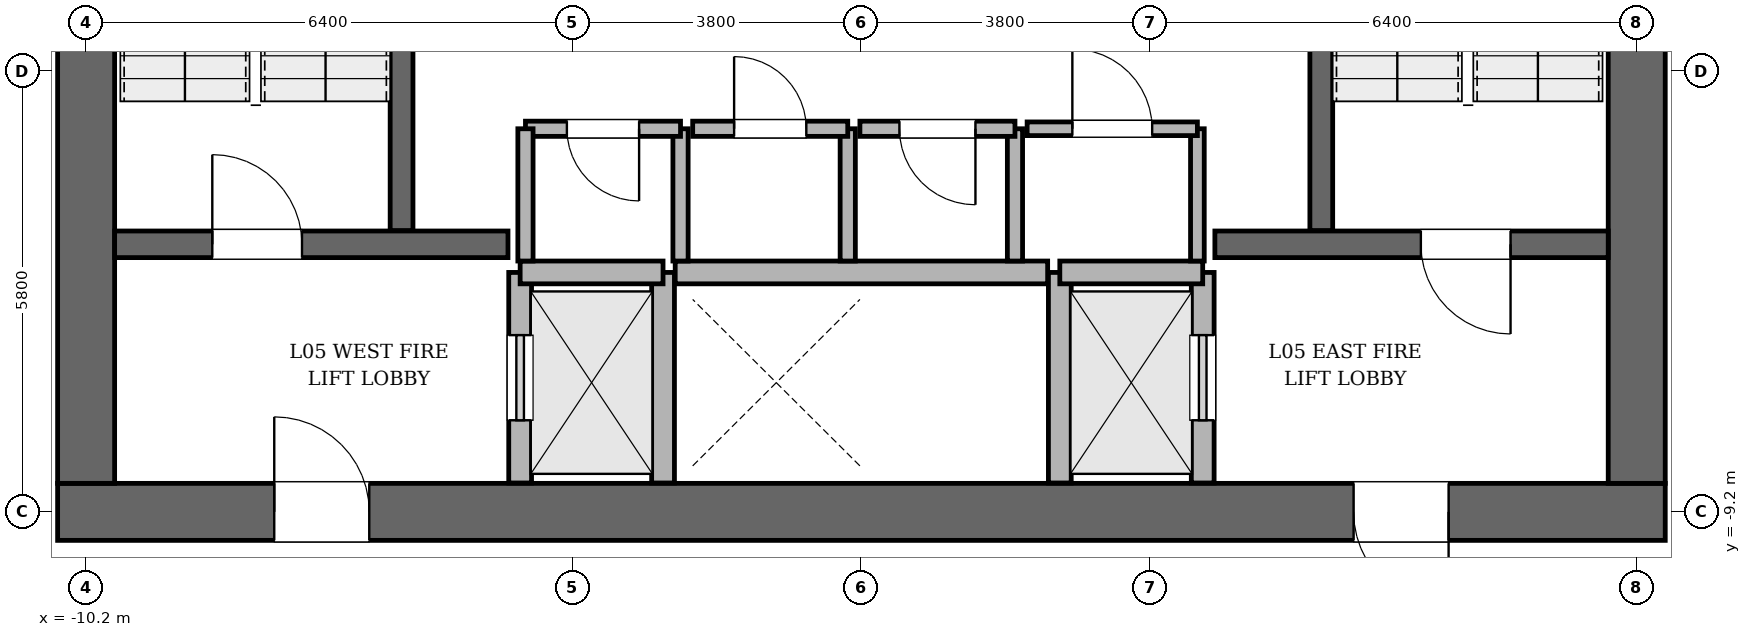
"""IFC4 building model, lengths in metres.
Left out: names, types, materials, properties, quantities, classifications, styles, units other than length and angle.
Written with IfcOpenShell. Run it as: python <this file> out.ifc"""

import sys

from ifc_helpers import new_model, si_unit, direction, frame, frame_2d, origin, place, context, subcontext, project, spatial, rectangle, extrude, element, fill, save


model = new_model("IFC4")
c1 = context("Model", 3, precision=1e-05, world=origin(), true_north=direction((0.0, 1.0)))
c2 = subcontext(c1, "Body", "Model", "MODEL_VIEW")
j1 = project(units=[si_unit("LENGTHUNIT", "METRE"), si_unit("PLANEANGLEUNIT", "RADIAN")], contexts=[c1])
p1 = place(None, origin())
s1 = spatial("IfcSite", under=j1, at=p1, CompositionType="ELEMENT")
p2 = place(p1, origin())
s2 = spatial("IfcBuilding", under=s1, at=p2, CompositionType="ELEMENT")
p3 = place(p2, frame((0.0, 0.0, 28.2)))
s3 = spatial("IfcBuildingStorey", under=s2, at=p3, CompositionType="ELEMENT", Elevation=28.2)
p4 = place(p3, frame((10.575, -9.2, 0.0), z_axis=(0.0, 0.0, 1.0), x_axis=(-1.0, 0.0, 0.0)))
e1 = element("IfcWall", 1, at=p4, inside=s3, PredefinedType="SHEAR", context=c2, shape_type="SweptSolid", body=[
    extrude(rectangle(XDim=21.15, YDim=0.75, at=frame_2d((10.575, 0.0))), origin(), (0.0, 0.0, 1.0), 4.05),
])
p5 = place(p4, frame((2.85, 0.0, 0.0)))
e2 = element("IfcOpeningElement", 2, at=p5, cuts=e1, PredefinedType="OPENING", context=c2, shape_type="SweptSolid", body=[
    extrude(rectangle(XDim=1.25, YDim=2.25, at=frame_2d((0.625, 1.125))), frame((0.0, 0.385, 0.0), z_axis=(0.0, -1.0, 0.0), x_axis=(1.0, 0.0, 0.0)), (0.0, 0.0, 1.0), 0.77),
])
p6 = place(p4, frame((17.05, 0.0, 0.0)))
e3 = element("IfcOpeningElement", 3, at=p6, cuts=e1, PredefinedType="OPENING", context=c2, shape_type="SweptSolid", body=[
    extrude(rectangle(XDim=1.25, YDim=2.25, at=frame_2d((0.625, 1.125))), frame((0.0, 0.385, 0.0), z_axis=(0.0, -1.0, 0.0), x_axis=(1.0, 0.0, 0.0)), (0.0, 0.0, 1.0), 0.77),
])
p7 = place(p3, frame((-10.2, -8.825, 0.0), z_axis=(0.0, 0.0, 1.0), x_axis=(0.0, 1.0, 0.0)))
e4 = element("IfcWall", 4, at=p7, inside=s3, PredefinedType="SHEAR", context=c2, shape_type="SweptSolid", body=[
    extrude(rectangle(XDim=17.65, YDim=0.75, at=frame_2d((8.825, 0.0))), origin(), (0.0, 0.0, 1.0), 4.05),
])
p8 = place(p7, frame((12.615, 0.0, 0.0)))
e5 = element("IfcOpeningElement", 5, at=p8, cuts=e4, PredefinedType="OPENING", context=c2, shape_type="SweptSolid", body=[
    extrude(rectangle(XDim=1.18, YDim=2.2, at=frame_2d((0.59, 1.1))), frame((0.0, 0.385, 0.0), z_axis=(0.0, -1.0, 0.0), x_axis=(1.0, 0.0, 0.0)), (0.0, 0.0, 1.0), 0.77),
])
p9 = place(p3, frame((10.2, 8.825, 0.0), z_axis=(0.0, 0.0, 1.0), x_axis=(0.0, -1.0, 0.0)))
e6 = element("IfcWall", 6, at=p9, inside=s3, PredefinedType="SHEAR", context=c2, shape_type="SweptSolid", body=[
    extrude(rectangle(XDim=17.65, YDim=0.75, at=frame_2d((8.825, 0.0))), origin(), (0.0, 0.0, 1.0), 4.05),
])
p10 = place(p9, frame((3.855, 0.0, 0.0)))
e7 = element("IfcOpeningElement", 7, at=p10, cuts=e6, PredefinedType="OPENING", context=c2, shape_type="SweptSolid", body=[
    extrude(rectangle(XDim=1.18, YDim=2.2, at=frame_2d((0.59, 1.1))), frame((0.0, 0.385, 0.0), z_axis=(0.0, -1.0, 0.0), x_axis=(1.0, 0.0, 0.0)), (0.0, 0.0, 1.0), 0.77),
])
for number, where, z_axis, x_axis in (
    (8, (-6.05, -5.5, 0.0), (0.0, 0.0, 1.0), (0.0, 1.0, 0.0)),
    (9, (6.05, 3.45, 0.0), (0.0, 0.0, 1.0), (0.0, -1.0, 0.0)),
):
    element("IfcWall", number, at=place(p3, frame(where, z_axis=z_axis, x_axis=x_axis)), inside=s3, PredefinedType="SOLIDWALL", context=c2, shape_type="SweptSolid", body=[
        extrude(rectangle(XDim=8.95, YDim=0.3, at=frame_2d((4.475, 0.0))), origin(), (0.0, 0.0, 1.0), 4.05),
    ])
p11 = place(p3, frame((-9.825, -5.68, 0.0), z_axis=(0.0, 0.0, 1.0), x_axis=(1.0, 0.0, 0.0)))
e10 = element("IfcWall", 10, at=p11, inside=s3, PredefinedType="SOLIDWALL", context=c2, shape_type="SweptSolid", body=[
    extrude(rectangle(XDim=5.175, YDim=0.35, at=frame_2d((2.587, 0.0))), origin(), (0.0, 0.0, 1.0), 4.05),
])
p12 = place(p11, frame((1.285, 0.0, 0.0)))
e11 = element("IfcOpeningElement", 11, at=p12, cuts=e10, PredefinedType="OPENING", context=c2, shape_type="SweptSolid", body=[
    extrude(rectangle(XDim=1.18, YDim=2.2, at=frame_2d((0.59, 1.1))), frame((0.0, 0.185, 0.0), z_axis=(0.0, -1.0, 0.0), x_axis=(1.0, 0.0, 0.0)), (0.0, 0.0, 1.0), 0.37),
])
p13 = place(p3, frame((4.65, -5.68, 0.0), z_axis=(0.0, 0.0, 1.0), x_axis=(1.0, 0.0, 0.0)))
e12 = element("IfcWall", 12, at=p13, inside=s3, PredefinedType="SOLIDWALL", context=c2, shape_type="SweptSolid", body=[
    extrude(rectangle(XDim=5.175, YDim=0.35, at=frame_2d((2.587, 0.0))), origin(), (0.0, 0.0, 1.0), 4.05),
])
p14 = place(p13, frame((2.71, 0.0, 0.0)))
e13 = element("IfcOpeningElement", 13, at=p14, cuts=e12, PredefinedType="OPENING", context=c2, shape_type="SweptSolid", body=[
    extrude(rectangle(XDim=1.18, YDim=2.2, at=frame_2d((0.59, 1.1))), frame((0.0, 0.185, 0.0), z_axis=(0.0, -1.0, 0.0), x_axis=(1.0, 0.0, 0.0)), (0.0, 0.0, 1.0), 0.37),
])
p15 = place(p3, frame((-4.49, -8.82, 0.0), z_axis=(0.0, 0.0, 1.0), x_axis=(0.0, 1.0, 0.0)))
e14 = element("IfcWall", 14, at=p15, inside=s3, PredefinedType="SOLIDWALL", context=c2, shape_type="SweptSolid", body=[
    extrude(rectangle(XDim=2.77, YDim=0.3, at=frame_2d((1.385, 0.0))), origin(), (0.0, 0.0, 1.0), 3.81),
])
p16 = place(p15, frame((0.825, 0.0, 0.0)))
e15 = element("IfcOpeningElement", 15, at=p16, cuts=e14, PredefinedType="OPENING", context=c2, shape_type="SweptSolid", body=[
    extrude(rectangle(XDim=1.12, YDim=2.25, at=frame_2d((0.56, 1.125))), frame((0.0, 0.16, 0.0), z_axis=(0.0, -1.0, 0.0), x_axis=(1.0, 0.0, 0.0)), (0.0, 0.0, 1.0), 0.32),
])
p17 = place(p3, frame((-2.61, -8.82, 0.0), z_axis=(0.0, 0.0, 1.0), x_axis=(0.0, 1.0, 0.0)))
e16 = element("IfcWall", 16, at=p17, inside=s3, PredefinedType="SOLIDWALL", context=c2, shape_type="SweptSolid", body=[
    extrude(rectangle(XDim=2.77, YDim=0.3, at=frame_2d((1.385, 0.0))), origin(), (0.0, 0.0, 1.0), 3.81),
])
p18 = place(p3, frame((-4.49, -6.05, 0.0), z_axis=(0.0, 0.0, 1.0), x_axis=(1.0, 0.0, 0.0)))
e17 = element("IfcWall", 17, at=p18, inside=s3, PredefinedType="SOLIDWALL", context=c2, shape_type="SweptSolid", body=[
    extrude(rectangle(XDim=1.88, YDim=0.3, at=frame_2d((0.94, 0.0))), origin(), (0.0, 0.0, 1.0), 3.81),
])
p19 = place(p3, frame((4.49, -8.82, 0.0), z_axis=(0.0, 0.0, 1.0), x_axis=(0.0, 1.0, 0.0)))
e18 = element("IfcWall", 18, at=p19, inside=s3, PredefinedType="SOLIDWALL", context=c2, shape_type="SweptSolid", body=[
    extrude(rectangle(XDim=2.77, YDim=0.3, at=frame_2d((1.385, 0.0))), origin(), (0.0, 0.0, 1.0), 3.81),
])
p20 = place(p19, frame((0.825, 0.0, 0.0)))
e19 = element("IfcOpeningElement", 19, at=p20, cuts=e18, PredefinedType="OPENING", context=c2, shape_type="SweptSolid", body=[
    extrude(rectangle(XDim=1.12, YDim=2.25, at=frame_2d((0.56, 1.125))), frame((0.0, 0.16, 0.0), z_axis=(0.0, -1.0, 0.0), x_axis=(1.0, 0.0, 0.0)), (0.0, 0.0, 1.0), 0.32),
])
p21 = place(p3, frame((2.61, -8.82, 0.0), z_axis=(0.0, 0.0, 1.0), x_axis=(0.0, 1.0, 0.0)))
e20 = element("IfcWall", 20, at=p21, inside=s3, PredefinedType="SOLIDWALL", context=c2, shape_type="SweptSolid", body=[
    extrude(rectangle(XDim=2.77, YDim=0.3, at=frame_2d((1.385, 0.0))), origin(), (0.0, 0.0, 1.0), 3.81),
])
p22 = place(p3, frame((2.61, -6.05, 0.0), z_axis=(0.0, 0.0, 1.0), x_axis=(1.0, 0.0, 0.0)))
e21 = element("IfcWall", 21, at=p22, inside=s3, PredefinedType="SOLIDWALL", context=c2, shape_type="SweptSolid", body=[
    extrude(rectangle(XDim=1.88, YDim=0.3, at=frame_2d((0.94, 0.0))), origin(), (0.0, 0.0, 1.0), 3.81),
])
p23 = place(p3, frame((-2.45, -6.05, 0.0), z_axis=(0.0, 0.0, 1.0), x_axis=(1.0, 0.0, 0.0)))
e22 = element("IfcWall", 22, at=p23, inside=s3, PredefinedType="SOLIDWALL", context=c2, shape_type="SweptSolid", body=[
    extrude(rectangle(XDim=4.9, YDim=0.3, at=frame_2d((2.45, 0.0))), origin(), (0.0, 0.0, 1.0), 3.81),
])
p24 = place(p3, frame((-2.38, -5.9, 0.0), z_axis=(0.0, 0.0, 1.0), x_axis=(0.0, 1.0, 0.0)))
e23 = element("IfcWall", 23, at=p24, inside=s3, PredefinedType="SOLIDWALL", context=c2, shape_type="SweptSolid", body=[
    extrude(rectangle(XDim=1.74, YDim=0.2, at=frame_2d((0.87, 0.0))), origin(), (0.0, 0.0, 1.0), 3.81),
])
p25 = place(p3, frame((-2.38, -4.16, 0.0), z_axis=(0.0, 0.0, 1.0), x_axis=(-1.0, 0.0, 0.0)))
e24 = element("IfcWall", 24, at=p25, inside=s3, PredefinedType="SOLIDWALL", context=c2, shape_type="SweptSolid", body=[
    extrude(rectangle(XDim=2.04, YDim=0.2, at=frame_2d((1.02, 0.0))), origin(), (0.0, 0.0, 1.0), 3.81),
])
p26 = place(p25, frame((0.545, 0.0, 0.0)))
e25 = element("IfcOpeningElement", 25, at=p26, cuts=e24, PredefinedType="OPENING", context=c2, shape_type="SweptSolid", body=[
    extrude(rectangle(XDim=0.95, YDim=2.15, at=frame_2d((0.475, 1.075))), frame((0.0, 0.11, 0.0), z_axis=(0.0, -1.0, 0.0), x_axis=(1.0, 0.0, 0.0)), (0.0, 0.0, 1.0), 0.22),
])
for number, where, z_axis, x_axis in (
    (26, (-4.42, -4.16, 0.0), (0.0, 0.0, 1.0), (0.0, -1.0, 0.0)),
    (27, (-0.18, -5.9, 0.0), (0.0, 0.0, 1.0), (0.0, 1.0, 0.0)),
):
    element("IfcWall", number, at=place(p3, frame(where, z_axis=z_axis, x_axis=x_axis)), inside=s3, PredefinedType="SOLIDWALL", context=c2, shape_type="SweptSolid", body=[
        extrude(rectangle(XDim=1.74, YDim=0.2, at=frame_2d((0.87, 0.0))), origin(), (0.0, 0.0, 1.0), 3.81),
    ])
p27 = place(p3, frame((-0.18, -4.16, 0.0), z_axis=(0.0, 0.0, 1.0), x_axis=(-1.0, 0.0, 0.0)))
e28 = element("IfcWall", 28, at=p27, inside=s3, PredefinedType="SOLIDWALL", context=c2, shape_type="SweptSolid", body=[
    extrude(rectangle(XDim=2.04, YDim=0.2, at=frame_2d((1.02, 0.0))), origin(), (0.0, 0.0, 1.0), 3.81),
])
p28 = place(p27, frame((0.545, 0.0, 0.0)))
e29 = element("IfcOpeningElement", 29, at=p28, cuts=e28, PredefinedType="OPENING", context=c2, shape_type="SweptSolid", body=[
    extrude(rectangle(XDim=0.95, YDim=2.15, at=frame_2d((0.475, 1.075))), frame((0.0, 0.11, 0.0), z_axis=(0.0, -1.0, 0.0), x_axis=(1.0, 0.0, 0.0)), (0.0, 0.0, 1.0), 0.22),
])
p29 = place(p3, frame((2.02, -5.9, 0.0), z_axis=(0.0, 0.0, 1.0), x_axis=(0.0, 1.0, 0.0)))
e30 = element("IfcWall", 30, at=p29, inside=s3, PredefinedType="SOLIDWALL", context=c2, shape_type="SweptSolid", body=[
    extrude(rectangle(XDim=1.74, YDim=0.2, at=frame_2d((0.87, 0.0))), origin(), (0.0, 0.0, 1.0), 3.81),
])
p30 = place(p3, frame((2.02, -4.16, 0.0), z_axis=(0.0, 0.0, 1.0), x_axis=(-1.0, 0.0, 0.0)))
e31 = element("IfcWall", 31, at=p30, inside=s3, PredefinedType="SOLIDWALL", context=c2, shape_type="SweptSolid", body=[
    extrude(rectangle(XDim=2.04, YDim=0.2, at=frame_2d((1.02, 0.0))), origin(), (0.0, 0.0, 1.0), 3.81),
])
p31 = place(p30, frame((0.52, 0.0, 0.0)))
e32 = element("IfcOpeningElement", 32, at=p31, cuts=e31, PredefinedType="OPENING", context=c2, shape_type="SweptSolid", body=[
    extrude(rectangle(XDim=1.0, YDim=2.15, at=frame_2d((0.5, 1.075))), frame((0.0, 0.11, 0.0), z_axis=(0.0, -1.0, 0.0), x_axis=(1.0, 0.0, 0.0)), (0.0, 0.0, 1.0), 0.22),
])
p32 = place(p3, frame((4.42, -5.9, 0.0), z_axis=(0.0, 0.0, 1.0), x_axis=(0.0, 1.0, 0.0)))
e33 = element("IfcWall", 33, at=p32, inside=s3, PredefinedType="PARTITIONING", context=c2, shape_type="SweptSolid", body=[
    extrude(rectangle(XDim=1.74, YDim=0.18, at=frame_2d((0.87, 0.0))), origin(), (0.0, 0.0, 1.0), 3.81),
])
p33 = place(p3, frame((4.42, -4.16, 0.0), z_axis=(0.0, 0.0, 1.0), x_axis=(-1.0, 0.0, 0.0)))
e34 = element("IfcWall", 34, at=p33, inside=s3, PredefinedType="PARTITIONING", context=c2, shape_type="SweptSolid", body=[
    extrude(rectangle(XDim=2.24, YDim=0.18, at=frame_2d((1.12, 0.0))), origin(), (0.0, 0.0, 1.0), 3.81),
])
p34 = place(p33, frame((0.595, 0.0, 0.0)))
e35 = element("IfcOpeningElement", 35, at=p34, cuts=e34, PredefinedType="OPENING", context=c2, shape_type="SweptSolid", body=[
    extrude(rectangle(XDim=1.05, YDim=2.2, at=frame_2d((0.525, 1.1))), frame((0.0, 0.1, 0.0), z_axis=(0.0, -1.0, 0.0), x_axis=(1.0, 0.0, 0.0)), (0.0, 0.0, 1.0), 0.2),
])
p35 = place(p12, origin())
e36 = element("IfcDoor", 36, at=p35, inside=s3, OperationType="SINGLE_SWING_LEFT", PredefinedType="DOOR", context=c2, shape_type="SweptSolid", body=[
    extrude(rectangle(XDim=1.18, YDim=2.2, at=frame_2d((0.59, 1.1))), frame((0.0, 0.025, 0.0), z_axis=(0.0, -1.0, 0.0), x_axis=(1.0, 0.0, 0.0)), (0.0, 0.0, 1.0), 0.05),
])
fill(e11, e36)
p36 = place(p14, origin())
e37 = element("IfcDoor", 37, at=p36, inside=s3, OperationType="SINGLE_SWING_RIGHT", PredefinedType="DOOR", context=c2, shape_type="SweptSolid", body=[
    extrude(rectangle(XDim=1.18, YDim=2.2, at=frame_2d((0.59, 1.1))), frame((0.0, 0.025, 0.0), z_axis=(0.0, -1.0, 0.0), x_axis=(1.0, 0.0, 0.0)), (0.0, 0.0, 1.0), 0.05),
])
fill(e13, e37)
p37 = place(p5, origin())
e38 = element("IfcDoor", 38, at=p37, inside=s3, OperationType="SINGLE_SWING_LEFT", PredefinedType="DOOR", context=c2, shape_type="SweptSolid", body=[
    extrude(rectangle(XDim=1.25, YDim=2.25, at=frame_2d((0.625, 1.125))), frame((0.0, 0.025, 0.0), z_axis=(0.0, -1.0, 0.0), x_axis=(1.0, 0.0, 0.0)), (0.0, 0.0, 1.0), 0.05),
])
fill(e2, e38)
p38 = place(p6, origin())
e39 = element("IfcDoor", 39, at=p38, inside=s3, OperationType="SINGLE_SWING_RIGHT", PredefinedType="DOOR", context=c2, shape_type="SweptSolid", body=[
    extrude(rectangle(XDim=1.25, YDim=2.25, at=frame_2d((0.625, 1.125))), frame((0.0, 0.025, 0.0), z_axis=(0.0, -1.0, 0.0), x_axis=(1.0, 0.0, 0.0)), (0.0, 0.0, 1.0), 0.05),
])
fill(e3, e39)
p39 = place(p16, origin())
e40 = element("IfcDoor", 40, at=p39, inside=s3, OperationType="SLIDING_TO_LEFT", PredefinedType="DOOR", context=c2, shape_type="SweptSolid", body=[
    extrude(rectangle(XDim=1.12, YDim=2.25, at=frame_2d((0.56, 1.125))), frame((0.0, 0.025, 0.0), z_axis=(0.0, -1.0, 0.0), x_axis=(1.0, 0.0, 0.0)), (0.0, 0.0, 1.0), 0.05),
])
fill(e15, e40)
p40 = place(p20, origin())
e41 = element("IfcDoor", 41, at=p40, inside=s3, OperationType="SLIDING_TO_RIGHT", PredefinedType="DOOR", context=c2, shape_type="SweptSolid", body=[
    extrude(rectangle(XDim=1.12, YDim=2.25, at=frame_2d((0.56, 1.125))), frame((0.0, 0.025, 0.0), z_axis=(0.0, -1.0, 0.0), x_axis=(1.0, 0.0, 0.0)), (0.0, 0.0, 1.0), 0.05),
])
fill(e19, e41)
p41 = place(p26, origin())
e42 = element("IfcDoor", 42, at=p41, inside=s3, OperationType="SINGLE_SWING_LEFT", PredefinedType="DOOR", context=c2, shape_type="SweptSolid", body=[
    extrude(rectangle(XDim=0.95, YDim=2.15, at=frame_2d((0.475, 1.075))), frame((0.0, 0.025, 0.0), z_axis=(0.0, -1.0, 0.0), x_axis=(1.0, 0.0, 0.0)), (0.0, 0.0, 1.0), 0.05),
])
fill(e25, e42)
p42 = place(p28, origin())
e43 = element("IfcDoor", 43, at=p42, inside=s3, OperationType="SINGLE_SWING_RIGHT", PredefinedType="DOOR", context=c2, shape_type="SweptSolid", body=[
    extrude(rectangle(XDim=0.95, YDim=2.15, at=frame_2d((0.475, 1.075))), frame((0.0, 0.025, 0.0), z_axis=(0.0, -1.0, 0.0), x_axis=(1.0, 0.0, 0.0)), (0.0, 0.0, 1.0), 0.05),
])
fill(e29, e43)
p43 = place(p31, origin())
e44 = element("IfcDoor", 44, at=p43, inside=s3, OperationType="SINGLE_SWING_LEFT", PredefinedType="DOOR", context=c2, shape_type="SweptSolid", body=[
    extrude(rectangle(XDim=1.0, YDim=2.15, at=frame_2d((0.5, 1.075))), frame((0.0, 0.025, 0.0), z_axis=(0.0, -1.0, 0.0), x_axis=(1.0, 0.0, 0.0)), (0.0, 0.0, 1.0), 0.05),
])
fill(e32, e44)
p44 = place(p34, origin())
e45 = element("IfcDoor", 45, at=p44, inside=s3, OperationType="SINGLE_SWING_RIGHT", PredefinedType="DOOR", context=c2, shape_type="SweptSolid", body=[
    extrude(rectangle(XDim=1.05, YDim=2.2, at=frame_2d((0.525, 1.1))), frame((0.0, 0.025, 0.0), z_axis=(0.0, -1.0, 0.0), x_axis=(1.0, 0.0, 0.0)), (0.0, 0.0, 1.0), 0.05),
])
fill(e35, e45)
save(model, sys.argv[1])
